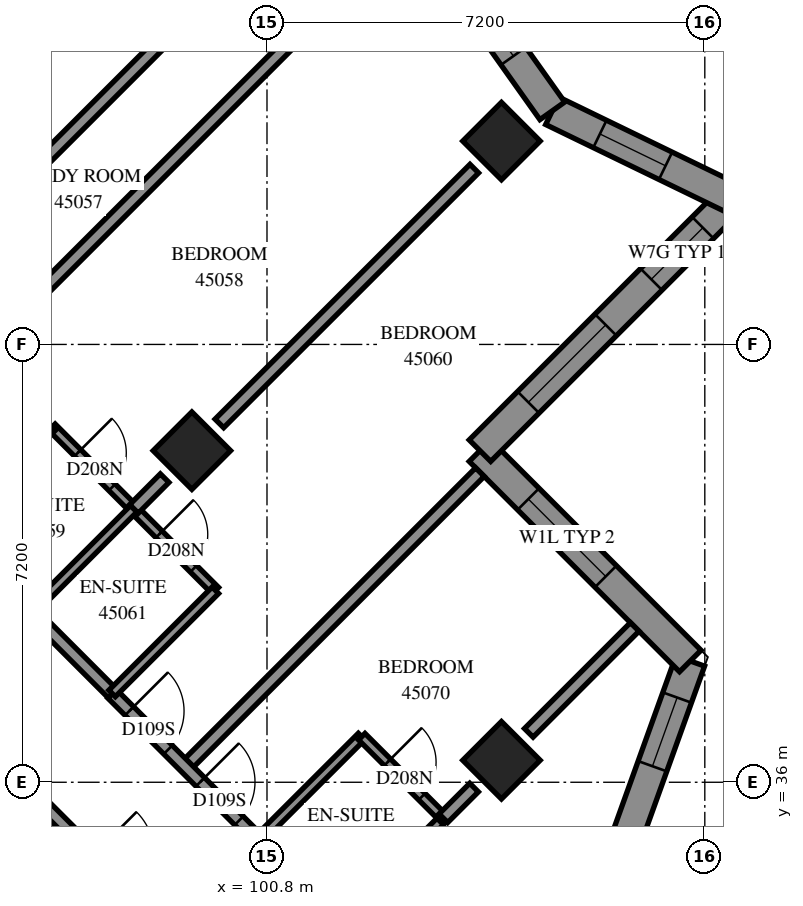
"""IFC4 building model, lengths in metres.
Left out: names, types, materials, properties, quantities, classifications, styles, units other than length and angle.
Written with IfcOpenShell. Run it as: python <this file> out.ifc"""

import sys

from ifc_helpers import new_model, si_unit, direction, frame, frame_2d, origin, origin_2d, place, context, subcontext, project, spatial, polyline, rectangle, outline, extrude, element, fill, save


model = new_model("IFC4")
c1 = context("Model", 3, precision=1e-05, world=origin(), true_north=direction((0.0, 1.0)))
c2 = subcontext(c1, "Body", "Model", "MODEL_VIEW")
j1 = project(units=[si_unit("LENGTHUNIT", "METRE"), si_unit("PLANEANGLEUNIT", "RADIAN")], contexts=[c1])
p1 = place(None, origin())
s1 = spatial("IfcSite", under=j1, at=p1, CompositionType="ELEMENT")
p2 = place(p1, origin())
s2 = spatial("IfcBuilding", under=s1, at=p2, CompositionType="ELEMENT")
p3 = place(p2, frame((0.0, 0.0, 166.0)))
s3 = spatial("IfcBuildingStorey", under=s2, at=p3, CompositionType="ELEMENT", Elevation=166.0)
for number, where, z_axis, x_axis in (
    (1, (104.656, 46.544, 0.0), (0.0, 0.0, 1.0), (0.707, -0.707, 0.0)),
    (2, (99.565, 41.453, 0.0), (0.0, 0.0, 1.0), (0.707, -0.707, 0.0)),
    (3, (104.656, 36.362, 0.0), (0.0, 0.0, 1.0), (0.707, -0.707, 0.0)),
):
    element("IfcColumn", number, at=place(p3, frame(where, z_axis=z_axis, x_axis=x_axis)), inside=s3, PredefinedType="COLUMN", context=c2, shape_type="SweptSolid", body=[
        extrude(rectangle(XDim=0.9, YDim=0.9, at=origin_2d()), origin(), (0.0, 0.0, 1.0), 3.1),
    ])
p4 = place(p3, frame((87.049, 38.695, -0.3), z_axis=(0.0, 0.0, 1.0), x_axis=(0.7071067812, 0.7071067812, 0.0)))
e4 = element("IfcWall", 4, at=p4, inside=s3, PredefinedType="SHEAR", context=c2, shape_type="SweptSolid", body=[
    extrude(rectangle(XDim=14.4, YDim=0.6, at=frame_2d((7.2, 0.0))), origin(), (0.0, 0.0, 1.0), 2.7),
])
p5 = place(p4, frame((4.55, 0.0, 0.3)))
e5 = element("IfcOpeningElement", 5, at=p5, cuts=e4, PredefinedType="OPENING", context=c2, shape_type="SweptSolid", body=[
    extrude(rectangle(XDim=1.1, YDim=2.1, at=frame_2d((0.55, 1.05))), frame((0.0, 0.31, 0.0), z_axis=(0.0, -1.0, 0.0), x_axis=(1.0, 0.0, 0.0)), (0.0, 0.0, 1.0), 0.62),
])
p6 = place(p4, frame((11.35, 0.0, 0.3)))
e6 = element("IfcOpeningElement", 6, at=p6, cuts=e4, PredefinedType="OPENING", context=c2, shape_type="SweptSolid", body=[
    extrude(rectangle(XDim=1.1, YDim=2.1, at=frame_2d((0.55, 1.05))), frame((0.0, 0.31, 0.0), z_axis=(0.0, -1.0, 0.0), x_axis=(1.0, 0.0, 0.0)), (0.0, 0.0, 1.0), 0.62),
])
p7 = place(p3, frame((105.949, 32.951, 0.0), z_axis=(0.0, 0.0, 1.0), x_axis=(0.3382165441, 0.9410683128, 0.0)))
e7 = element("IfcWall", 7, at=p7, inside=s3, PredefinedType="SOLIDWALL", context=c2, shape_type="SweptSolid", body=[
    extrude(outline(polyline([(-0.113, -0.25), (5.517, -0.25), (5.2, 0.25), (0.113, 0.25), (-0.113, -0.25)])), origin(), (0.0, 0.0, 1.0), 3.1),
])
p8 = place(p7, frame((1.176, 0.0, 0.45)))
e8 = element("IfcOpeningElement", 8, at=p8, cuts=e7, PredefinedType="OPENING", context=c2, shape_type="SweptSolid", body=[
    extrude(rectangle(XDim=1.2, YDim=2.5, at=frame_2d((0.6, 1.25))), frame((0.0, 0.26, 0.0), z_axis=(0.0, -1.0, 0.0), x_axis=(1.0, 0.0, 0.0)), (0.0, 0.0, 1.0), 0.52),
])
p9 = place(p7, frame((3.52, 0.0, 0.45)))
e9 = element("IfcOpeningElement", 9, at=p9, cuts=e7, PredefinedType="OPENING", context=c2, shape_type="SweptSolid", body=[
    extrude(rectangle(XDim=1.2, YDim=2.5, at=frame_2d((0.6, 1.25))), frame((0.0, 0.26, 0.0), z_axis=(0.0, -1.0, 0.0), x_axis=(1.0, 0.0, 0.0)), (0.0, 0.0, 1.0), 0.52),
])
p10 = place(p3, frame((107.761, 37.994, 0.0), z_axis=(0.0, 0.0, 1.0), x_axis=(-0.7071170028, 0.7070965594, 0.0)))
e10 = element("IfcWall", 10, at=p10, inside=s3, PredefinedType="SOLIDWALL", context=c2, shape_type="SweptSolid", body=[
    extrude(outline(polyline([(-0.159, -0.25), (4.641, -0.25), (5.141, 0.25), (0.159, 0.25), (-0.159, -0.25)])), origin(), (0.0, 0.0, 1.0), 3.1),
])
p11 = place(p10, frame((1.966, 0.0, 0.6)))
e11 = element("IfcOpeningElement", 11, at=p11, cuts=e10, PredefinedType="OPENING", context=c2, shape_type="SweptSolid", body=[
    extrude(rectangle(XDim=1.8, YDim=1.9, at=frame_2d((0.9, 0.95))), frame((0.0, 0.26, 0.0), z_axis=(0.0, -1.0, 0.0), x_axis=(1.0, 0.0, 0.0)), (0.0, 0.0, 1.0), 0.52),
])
p12 = place(p3, frame((104.302, 41.453, 0.0), z_axis=(0.0, 0.0, 1.0), x_axis=(0.7071238144, 0.7070897476, 0.0)))
e12 = element("IfcWall", 12, at=p12, inside=s3, PredefinedType="SOLIDWALL", context=c2, shape_type="SweptSolid", body=[
    extrude(outline(polyline([(0.25, -0.25), (6.222, -0.25), (5.52, 0.25), (-0.25, 0.25), (0.25, -0.25)])), origin(), (0.0, 0.0, 1.0), 3.1),
])
p13 = place(p12, frame((1.125, 0.0, 0.6)))
e13 = element("IfcOpeningElement", 13, at=p13, cuts=e12, PredefinedType="OPENING", context=c2, shape_type="SweptSolid", body=[
    extrude(rectangle(XDim=1.8, YDim=1.9, at=frame_2d((0.9, 0.95))), frame((0.0, 0.26, 0.0), z_axis=(0.0, -1.0, 0.0), x_axis=(1.0, 0.0, 0.0)), (0.0, 0.0, 1.0), 0.52),
])
p14 = place(p12, frame((3.985, 0.0, 0.6)))
e14 = element("IfcOpeningElement", 14, at=p14, cuts=e12, PredefinedType="OPENING", context=c2, shape_type="SweptSolid", body=[
    extrude(rectangle(XDim=1.2, YDim=1.9, at=frame_2d((0.6, 0.95))), frame((0.0, 0.26, 0.0), z_axis=(0.0, -1.0, 0.0), x_axis=(1.0, 0.0, 0.0)), (0.0, 0.0, 1.0), 0.52),
])
p15 = place(p3, frame((108.454, 45.604, 0.0), z_axis=(0.0, 0.0, 1.0), x_axis=(-0.8996561364, 0.4365991711, 0.0)))
e15 = element("IfcWall", 15, at=p15, inside=s3, PredefinedType="SOLIDWALL", context=c2, shape_type="SweptSolid", body=[
    extrude(outline(polyline([(-0.351, -0.25), (3.228, -0.25), (3.356, 0.25), (0.351, 0.25), (-0.351, -0.25)])), origin(), (0.0, 0.0, 1.0), 3.1),
])
p16 = place(p15, frame((1.222, 0.0, 0.45)))
e16 = element("IfcOpeningElement", 16, at=p16, cuts=e15, PredefinedType="OPENING", context=c2, shape_type="SweptSolid", body=[
    extrude(rectangle(XDim=1.2, YDim=2.5, at=frame_2d((0.6, 1.25))), frame((0.0, 0.26, 0.0), z_axis=(0.0, -1.0, 0.0), x_axis=(1.0, 0.0, 0.0)), (0.0, 0.0, 1.0), 0.52),
])
p17 = place(p3, frame((105.492, 47.041, 0.0), z_axis=(0.0, 0.0, 1.0), x_axis=(-0.5792714747, 0.8151346874, 0.0)))
e17 = element("IfcWall", 17, at=p17, inside=s3, PredefinedType="SOLIDWALL", context=c2, shape_type="SweptSolid", body=[
    extrude(outline(polyline([(0.064, -0.25), (3.494, -0.25), (3.409, 0.25), (-0.064, 0.25), (0.064, -0.25)])), origin(), (0.0, 0.0, 1.0), 3.1),
])
p18 = place(p17, frame((1.105, 0.0, 0.45)))
e18 = element("IfcOpeningElement", 18, at=p18, cuts=e17, PredefinedType="OPENING", context=c2, shape_type="SweptSolid", body=[
    extrude(rectangle(XDim=1.2, YDim=2.5, at=frame_2d((0.6, 1.25))), frame((0.0, 0.26, 0.0), z_axis=(0.0, -1.0, 0.0), x_axis=(1.0, 0.0, 0.0)), (0.0, 0.0, 1.0), 0.52),
])
p19 = place(p3, frame((91.967, 40.785, 0.0), z_axis=(0.0, 0.0, 1.0), x_axis=(0.7071067812, -0.7071067812, 0.0)))
e19 = element("IfcWall", 19, at=p19, inside=s3, PredefinedType="PARTITIONING", context=c2, shape_type="SweptSolid", body=[
    extrude(rectangle(XDim=12.1, YDim=0.2, at=frame_2d((6.05, 0.0))), origin(), (0.0, 0.0, 1.0), 3.1),
])
p20 = place(p19, frame((3.448, 0.0, 0.0)))
e20 = element("IfcOpeningElement", 20, at=p20, cuts=e19, PredefinedType="OPENING", context=c2, shape_type="SweptSolid", body=[
    extrude(rectangle(XDim=0.9, YDim=2.1, at=frame_2d((0.45, 1.05))), frame((0.0, 0.11, 0.0), z_axis=(0.0, -1.0, 0.0), x_axis=(1.0, 0.0, 0.0)), (0.0, 0.0, 1.0), 0.22),
])
p21 = place(p19, frame((8.457, 0.0, 0.0)))
e21 = element("IfcOpeningElement", 21, at=p21, cuts=e19, PredefinedType="OPENING", context=c2, shape_type="SweptSolid", body=[
    extrude(rectangle(XDim=1.0, YDim=2.1, at=frame_2d((0.5, 1.05))), frame((0.0, 0.11, 0.0), z_axis=(0.0, -1.0, 0.0), x_axis=(1.0, 0.0, 0.0)), (0.0, 0.0, 1.0), 0.22),
])
p22 = place(p3, frame((94.366, 41.348, 0.0), z_axis=(0.0, 0.0, 1.0), x_axis=(0.7071108994, 0.707102663, 0.0)))
e22 = element("IfcWall", 22, at=p22, inside=s3, PredefinedType="PARTITIONING", context=c2, shape_type="SweptSolid", body=[
    extrude(rectangle(XDim=12.141, YDim=0.2, at=frame_2d((6.071, 0.0))), origin(), (0.0, 0.0, 1.0), 3.1),
])
p23 = place(p3, frame((93.306, 42.408, 0.0), z_axis=(0.0, 0.0, 1.0), x_axis=(0.7071067812, 0.7071067812, 0.0)))
e23 = element("IfcWall", 23, at=p23, inside=s3, PredefinedType="PARTITIONING", context=c2, shape_type="SweptSolid", body=[
    extrude(rectangle(XDim=9.45, YDim=0.2, at=frame_2d((4.725, 0.0))), origin(), (0.0, 0.0, 1.0), 3.1),
])
p24 = place(p23, frame((0.253, 0.0, 0.0)))
e24 = element("IfcOpeningElement", 24, at=p24, cuts=e23, PredefinedType="OPENING", context=c2, shape_type="SweptSolid", body=[
    extrude(rectangle(XDim=1.0, YDim=2.1, at=frame_2d((0.5, 1.05))), frame((0.0, 0.11, 0.0), z_axis=(0.0, -1.0, 0.0), x_axis=(1.0, 0.0, 0.0)), (0.0, 0.0, 1.0), 0.22),
])
p25 = place(p3, frame((99.458, 36.256, 0.0), z_axis=(0.0, 0.0, 1.0), x_axis=(0.7071067812, 0.7071067812, 0.0)))
e25 = element("IfcWall", 25, at=p25, inside=s3, PredefinedType="PARTITIONING", context=c2, shape_type="SweptSolid", body=[
    extrude(rectangle(XDim=6.85, YDim=0.2, at=frame_2d((3.425, 0.0))), origin(), (0.0, 0.0, 1.0), 3.1),
])
p26 = place(p3, frame((100.017, 41.901, 0.0), z_axis=(0.0, 0.0, 1.0), x_axis=(0.7072754814, 0.7069380408, 0.0)))
e26 = element("IfcWall", 26, at=p26, inside=s3, PredefinedType="PARTITIONING", context=c2, shape_type="SweptSolid", body=[
    extrude(rectangle(XDim=5.927, YDim=0.2, at=frame_2d((2.963, 0.0))), origin(), (0.0, 0.0, 1.0), 3.1),
])
p27 = place(p3, frame((98.253, 37.455, 0.0), z_axis=(0.0, 0.0, 1.0), x_axis=(0.7071067812, -0.7071067812, 0.0)))
e27 = element("IfcWall", 27, at=p27, inside=s3, PredefinedType="PARTITIONING", context=c2, shape_type="SweptSolid", body=[
    extrude(rectangle(XDim=5.301, YDim=0.2, at=frame_2d((2.65, 0.0))), origin(), (0.0, 0.0, 1.0), 3.1),
])
p28 = place(p27, frame((0.401, 0.0, 0.0)))
e28 = element("IfcOpeningElement", 28, at=p28, cuts=e27, PredefinedType="OPENING", context=c2, shape_type="SweptSolid", body=[
    extrude(rectangle(XDim=0.9, YDim=2.1, at=frame_2d((0.45, 1.05))), frame((0.0, 0.11, 0.0), z_axis=(0.0, -1.0, 0.0), x_axis=(1.0, 0.0, 0.0)), (0.0, 0.0, 1.0), 0.22),
])
p29 = place(p27, frame((2.05, 0.0, 0.0)))
e29 = element("IfcOpeningElement", 29, at=p29, cuts=e27, PredefinedType="OPENING", context=c2, shape_type="SweptSolid", body=[
    extrude(rectangle(XDim=0.9, YDim=2.1, at=frame_2d((0.45, 1.05))), frame((0.0, 0.11, 0.0), z_axis=(0.0, -1.0, 0.0), x_axis=(1.0, 0.0, 0.0)), (0.0, 0.0, 1.0), 0.22),
])
p30 = place(p3, frame((97.263, 41.839, 0.0), z_axis=(0.0, 0.0, 1.0), x_axis=(0.7071067812, -0.7071067812, 0.0)))
e30 = element("IfcWall", 30, at=p30, inside=s3, PredefinedType="PARTITIONING", context=c2, shape_type="SweptSolid", body=[
    extrude(rectangle(XDim=3.801, YDim=0.15, at=frame_2d((1.901, 0.0))), origin(), (0.0, 0.0, 1.0), 3.1),
])
p31 = place(p30, frame((0.598, 0.0, 0.0)))
e31 = element("IfcOpeningElement", 31, at=p31, cuts=e30, PredefinedType="OPENING", context=c2, shape_type="SweptSolid", body=[
    extrude(rectangle(XDim=0.8, YDim=2.1, at=frame_2d((0.4, 1.05))), frame((0.0, 0.085, 0.0), z_axis=(0.0, -1.0, 0.0), x_axis=(1.0, 0.0, 0.0)), (0.0, 0.0, 1.0), 0.17),
])
p32 = place(p30, frame((2.493, 0.0, 0.0)))
e32 = element("IfcOpeningElement", 32, at=p32, cuts=e30, PredefinedType="OPENING", context=c2, shape_type="SweptSolid", body=[
    extrude(rectangle(XDim=0.8, YDim=2.1, at=frame_2d((0.4, 1.05))), frame((0.0, 0.085, 0.0), z_axis=(0.0, -1.0, 0.0), x_axis=(1.0, 0.0, 0.0)), (0.0, 0.0, 1.0), 0.17),
])
p33 = place(p3, frame((95.573, 40.148, 0.0), z_axis=(0.0, 0.0, 1.0), x_axis=(0.7068698107, -0.7073436723, 0.0)))
e33 = element("IfcWall", 33, at=p33, inside=s3, PredefinedType="PARTITIONING", context=c2, shape_type="SweptSolid", body=[
    extrude(rectangle(XDim=3.799, YDim=0.2, at=frame_2d((1.899, 0.0))), origin(), (0.0, 0.0, 1.0), 3.1),
])
p34 = place(p3, frame((105.105, 36.813, 0.0), z_axis=(0.0, 0.0, 1.0), x_axis=(0.7071067812, 0.7071067812, 0.0)))
e34 = element("IfcWall", 34, at=p34, inside=s3, PredefinedType="PARTITIONING", context=c2, shape_type="SweptSolid", body=[
    extrude(rectangle(XDim=2.463, YDim=0.2, at=frame_2d((1.232, 0.0))), origin(), (0.0, 0.0, 1.0), 3.1),
])
p35 = place(p3, frame((102.003, 33.711, 0.0), z_axis=(0.0, 0.0, 1.0), x_axis=(0.7071067812, 0.7071067812, 0.0)))
e35 = element("IfcWall", 35, at=p35, inside=s3, PredefinedType="PARTITIONING", context=c2, shape_type="SweptSolid", body=[
    extrude(rectangle(XDim=2.401, YDim=0.15, at=frame_2d((1.201, 0.0))), origin(), (0.0, 0.0, 1.0), 2.6),
])
for number, where, z_axis, x_axis in (
    (36, (95.571, 40.143, 0.0), (0.0, 0.0, 1.0), (0.707, 0.708, 0.0)),
    (37, (98.253, 37.461, 0.0), (0.0, 0.0, 1.0), (0.708, 0.707, 0.0)),
    (38, (100.657, 35.057, 0.0), (0.0, 0.0, 1.0), (0.708, 0.707, 0.0)),
):
    element("IfcWall", number, at=place(p3, frame(where, z_axis=z_axis, x_axis=x_axis)), inside=s3, PredefinedType="PARTITIONING", context=c2, shape_type="SweptSolid", body=[
        extrude(rectangle(XDim=2.4, YDim=0.15, at=frame_2d((1.2, 0.0))), origin(), (0.0, 0.0, 1.0), 3.1),
    ])
p36 = place(p3, frame((96.913, 38.803, 0.0), z_axis=(0.0, 0.0, 1.0), x_axis=(0.7071067812, 0.7071067812, 0.0)))
e39 = element("IfcWall", 39, at=p36, inside=s3, PredefinedType="PARTITIONING", context=c2, shape_type="SweptSolid", body=[
    extrude(rectangle(XDim=2.398, YDim=0.15, at=frame_2d((1.199, 0.0))), origin(), (0.0, 0.0, 1.0), 3.1),
])
p37 = place(p3, frame((102.358, 36.75, 0.0), z_axis=(0.0, 0.0, 1.0), x_axis=(0.7076330979, -0.7065800724, 0.0)))
e40 = element("IfcWall", 40, at=p37, inside=s3, PredefinedType="PARTITIONING", context=c2, shape_type="SweptSolid", body=[
    extrude(rectangle(XDim=1.899, YDim=0.15, at=frame_2d((0.95, 0.0))), origin(), (0.0, 0.0, 1.0), 3.1),
])
p38 = place(p37, frame((0.597, 0.0, 0.0)))
e41 = element("IfcOpeningElement", 41, at=p38, cuts=e40, PredefinedType="OPENING", context=c2, shape_type="SweptSolid", body=[
    extrude(rectangle(XDim=0.8, YDim=2.1, at=frame_2d((0.4, 1.05))), frame((0.0, 0.085, 0.0), z_axis=(0.0, -1.0, 0.0), x_axis=(1.0, 0.0, 0.0)), (0.0, 0.0, 1.0), 0.17),
])
p39 = place(p3, frame((98.613, 40.495, 0.0), z_axis=(0.0, 0.0, 1.0), x_axis=(0.7057051861, 0.7085056035, 0.0)))
e42 = element("IfcWall", 42, at=p39, inside=s3, PredefinedType="PARTITIONING", context=c2, shape_type="SweptSolid", body=[
    extrude(rectangle(XDim=0.714, YDim=0.2, at=frame_2d((0.357, 0.0))), origin(), (0.0, 0.0, 1.0), 3.1),
])
p40 = place(p3, frame((103.701, 35.409, 0.0), z_axis=(0.0, 0.0, 1.0), x_axis=(0.7071067812, 0.7071067812, 0.0)))
e43 = element("IfcWall", 43, at=p40, inside=s3, PredefinedType="PARTITIONING", context=c2, shape_type="SweptSolid", body=[
    extrude(rectangle(XDim=0.713, YDim=0.2, at=frame_2d((0.356, 0.0))), origin(), (0.0, 0.0, 1.0), 2.6),
])
p41 = place(p9, origin())
e44 = element("IfcWindow", 44, at=p41, inside=s3, PartitioningType="SINGLE_PANEL", PredefinedType="WINDOW", context=c2, shape_type="SweptSolid", body=[
    extrude(rectangle(XDim=1.2, YDim=2.5, at=frame_2d((0.6, 1.25))), frame((0.0, 0.18, 0.0), z_axis=(0.0, -1.0, 0.0), x_axis=(1.0, 0.0, 0.0)), (0.0, 0.0, 1.0), 0.06),
])
fill(e9, e44)
p42 = place(p11, origin())
e45 = element("IfcWindow", 45, at=p42, inside=s3, PartitioningType="SINGLE_PANEL", PredefinedType="WINDOW", context=c2, shape_type="SweptSolid", body=[
    extrude(rectangle(XDim=1.8, YDim=1.9, at=frame_2d((0.9, 0.95))), frame((0.0, 0.18, 0.0), z_axis=(0.0, -1.0, 0.0), x_axis=(1.0, 0.0, 0.0)), (0.0, 0.0, 1.0), 0.06),
])
fill(e11, e45)
p43 = place(p13, origin())
e46 = element("IfcWindow", 46, at=p43, inside=s3, PartitioningType="SINGLE_PANEL", PredefinedType="WINDOW", context=c2, shape_type="SweptSolid", body=[
    extrude(rectangle(XDim=1.8, YDim=1.9, at=frame_2d((0.9, 0.95))), frame((0.0, 0.18, 0.0), z_axis=(0.0, -1.0, 0.0), x_axis=(1.0, 0.0, 0.0)), (0.0, 0.0, 1.0), 0.06),
])
fill(e13, e46)
p44 = place(p14, origin())
e47 = element("IfcWindow", 47, at=p44, inside=s3, PartitioningType="SINGLE_PANEL", PredefinedType="WINDOW", context=c2, shape_type="SweptSolid", body=[
    extrude(rectangle(XDim=1.2, YDim=1.9, at=frame_2d((0.6, 0.95))), frame((0.0, 0.18, 0.0), z_axis=(0.0, -1.0, 0.0), x_axis=(1.0, 0.0, 0.0)), (0.0, 0.0, 1.0), 0.06),
])
fill(e14, e47)
p45 = place(p16, origin())
e48 = element("IfcWindow", 48, at=p45, inside=s3, PartitioningType="SINGLE_PANEL", PredefinedType="WINDOW", context=c2, shape_type="SweptSolid", body=[
    extrude(rectangle(XDim=1.2, YDim=2.5, at=frame_2d((0.6, 1.25))), frame((0.0, 0.18, 0.0), z_axis=(0.0, -1.0, 0.0), x_axis=(1.0, 0.0, 0.0)), (0.0, 0.0, 1.0), 0.06),
])
fill(e16, e48)
p46 = place(p18, origin())
e49 = element("IfcWindow", 49, at=p46, inside=s3, PartitioningType="SINGLE_PANEL", PredefinedType="WINDOW", context=c2, shape_type="SweptSolid", body=[
    extrude(rectangle(XDim=1.2, YDim=2.5, at=frame_2d((0.6, 1.25))), frame((0.0, 0.18, 0.0), z_axis=(0.0, -1.0, 0.0), x_axis=(1.0, 0.0, 0.0)), (0.0, 0.0, 1.0), 0.06),
])
fill(e18, e49)
p47 = place(p31, origin())
e50 = element("IfcDoor", 50, at=p47, inside=s3, OperationType="SINGLE_SWING_RIGHT", PredefinedType="DOOR", context=c2, shape_type="SweptSolid", body=[
    extrude(rectangle(XDim=0.8, YDim=2.1, at=frame_2d((0.4, 1.05))), frame((0.0, 0.025, 0.0), z_axis=(0.0, -1.0, 0.0), x_axis=(1.0, 0.0, 0.0)), (0.0, 0.0, 1.0), 0.05),
])
fill(e31, e50)
p48 = place(p28, origin())
e51 = element("IfcDoor", 51, at=p48, inside=s3, OperationType="SINGLE_SWING_LEFT", PredefinedType="DOOR", context=c2, shape_type="SweptSolid", body=[
    extrude(rectangle(XDim=0.9, YDim=2.1, at=frame_2d((0.45, 1.05))), frame((0.0, 0.025, 0.0), z_axis=(0.0, -1.0, 0.0), x_axis=(1.0, 0.0, 0.0)), (0.0, 0.0, 1.0), 0.05),
])
fill(e28, e51)
p49 = place(p32, origin())
e52 = element("IfcDoor", 52, at=p49, inside=s3, OperationType="SINGLE_SWING_RIGHT", PredefinedType="DOOR", context=c2, shape_type="SweptSolid", body=[
    extrude(rectangle(XDim=0.8, YDim=2.1, at=frame_2d((0.4, 1.05))), frame((0.0, 0.025, 0.0), z_axis=(0.0, -1.0, 0.0), x_axis=(1.0, 0.0, 0.0)), (0.0, 0.0, 1.0), 0.05),
])
fill(e32, e52)
p50 = place(p29, origin())
e53 = element("IfcDoor", 53, at=p50, inside=s3, OperationType="SINGLE_SWING_RIGHT", PredefinedType="DOOR", context=c2, shape_type="SweptSolid", body=[
    extrude(rectangle(XDim=0.9, YDim=2.1, at=frame_2d((0.45, 1.05))), frame((0.0, 0.025, 0.0), z_axis=(0.0, -1.0, 0.0), x_axis=(1.0, 0.0, 0.0)), (0.0, 0.0, 1.0), 0.05),
])
fill(e29, e53)
p51 = place(p38, origin())
e54 = element("IfcDoor", 54, at=p51, inside=s3, OperationType="SINGLE_SWING_RIGHT", PredefinedType="DOOR", context=c2, shape_type="SweptSolid", body=[
    extrude(rectangle(XDim=0.8, YDim=2.1, at=frame_2d((0.4, 1.05))), frame((0.0, 0.025, 0.0), z_axis=(0.0, -1.0, 0.0), x_axis=(1.0, 0.0, 0.0)), (0.0, 0.0, 1.0), 0.05),
])
fill(e41, e54)
save(model, sys.argv[1])
